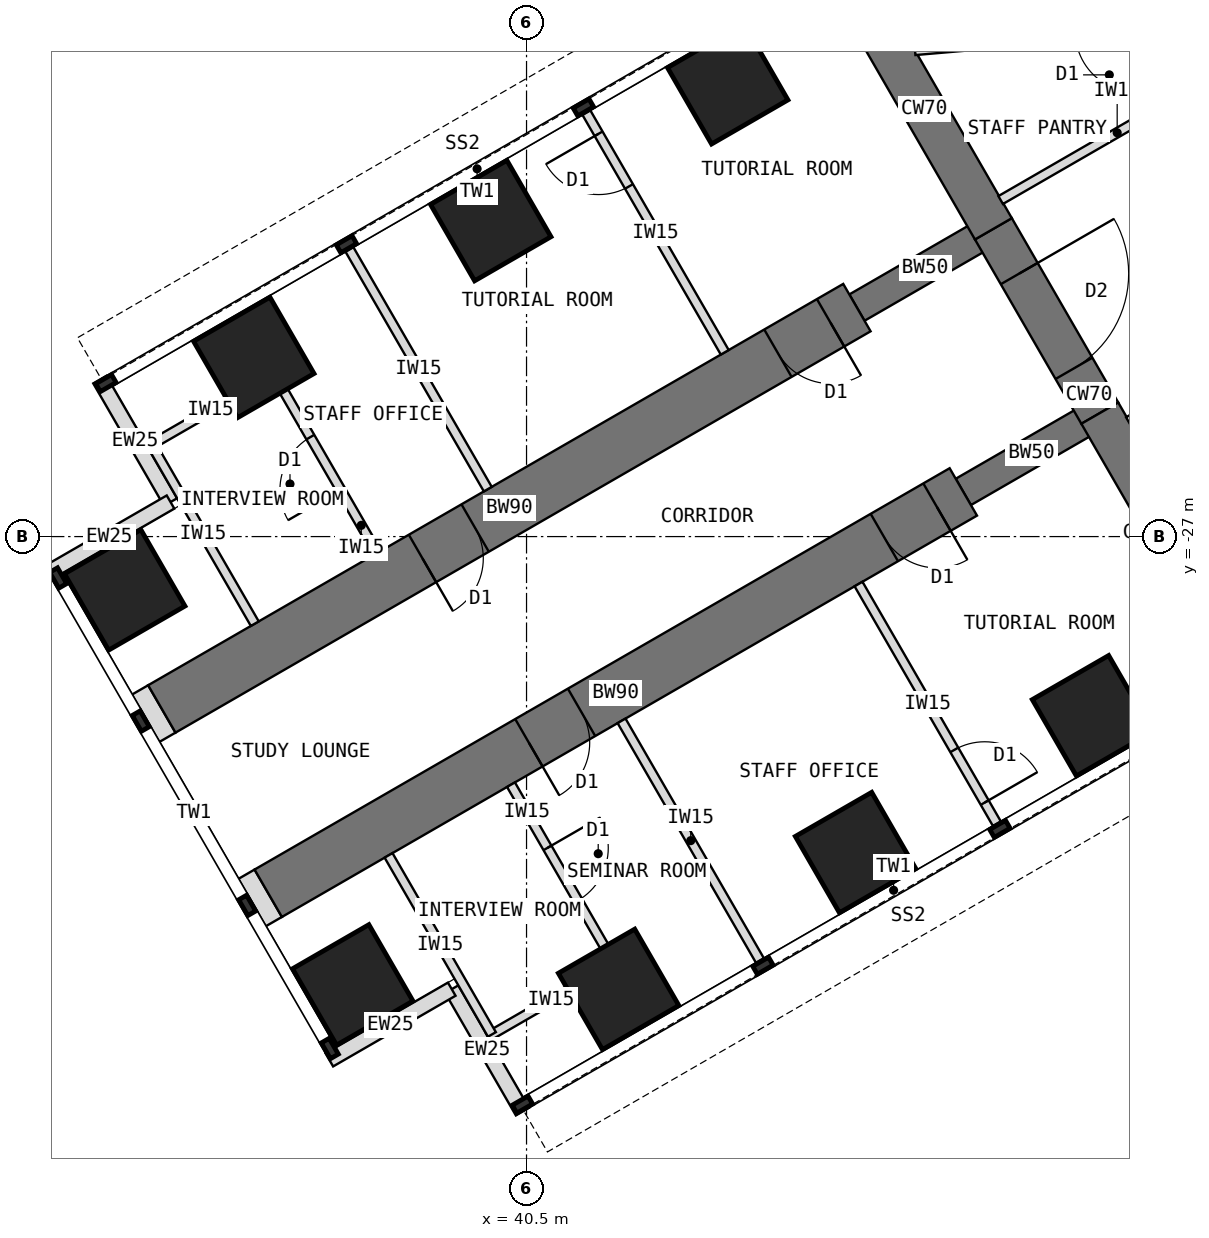
"""IFC4 building model, lengths in metres.
Left out: names, types, materials, properties, quantities, classifications, styles, units other than length and angle.
Written with IfcOpenShell. Run it as: python <this file> out.ifc"""

import sys

from ifc_helpers import new_model, si_unit, direction, frame, frame_2d, origin, origin_2d, place, context, subcontext, project, spatial, rectangle, extrude, element, fill, save


model = new_model("IFC4")
c1 = context("Model", 3, precision=1e-05, world=origin(), true_north=direction((0.0, 1.0)))
c2 = subcontext(c1, "Body", "Model", "MODEL_VIEW")
j1 = project(units=[si_unit("LENGTHUNIT", "METRE"), si_unit("PLANEANGLEUNIT", "RADIAN")], contexts=[c1])
p1 = place(None, origin())
s1 = spatial("IfcSite", under=j1, at=p1, CompositionType="ELEMENT")
p2 = place(p1, origin())
s2 = spatial("IfcBuilding", under=s1, at=p2, CompositionType="ELEMENT")
p3 = place(p2, frame((0.0, 0.0, 68.5)))
s3 = spatial("IfcBuildingStorey", under=s2, at=p3, CompositionType="ELEMENT", Elevation=68.5)
p4 = place(p3, frame((45.904, -18.0, 0.0), z_axis=(0.0, 0.0, 1.0), x_axis=(0.500024481964, -0.866011268655, 0.0)))
e1 = element("IfcWall", 1, at=p4, inside=s3, PredefinedType="SHEAR", context=c2, shape_type="SweptSolid", body=[
    extrude(rectangle(XDim=4.548, YDim=0.7, at=frame_2d((2.274, 0.0))), origin(), (0.0, 0.0, 1.0), 4.0),
])
p5 = place(p3, frame((48.178, -21.939, 0.0), z_axis=(0.0, 0.0, 1.0), x_axis=(0.500010275428, -0.866019471182, 0.0)))
e2 = element("IfcWall", 2, at=p5, inside=s3, PredefinedType="SHEAR", context=c2, shape_type="SweptSolid", body=[
    extrude(rectangle(XDim=3.5, YDim=0.7, at=frame_2d((1.75, 0.0))), origin(), (0.0, 0.0, 1.0), 4.0),
])
p6 = place(p5, frame((0.85, 0.0, 0.0)))
e3 = element("IfcOpeningElement", 3, at=p6, cuts=e2, PredefinedType="OPENING", context=c2, shape_type="SweptSolid", body=[
    extrude(rectangle(XDim=1.8, YDim=2.1, at=frame_2d((0.9, 1.05))), frame((0.0, 0.36, 0.0), z_axis=(0.0, -1.0, 0.0), x_axis=(1.0, 0.0, 0.0)), (0.0, 0.0, 1.0), 0.72),
])
p7 = place(p3, frame((49.928, -24.97, 0.0), z_axis=(0.0, 0.0, 1.0), x_axis=(0.499984222037, -0.866034513004, 0.0)))
e4 = element("IfcWall", 4, at=p7, inside=s3, PredefinedType="SHEAR", context=c2, shape_type="SweptSolid", body=[
    extrude(rectangle(XDim=4.548, YDim=0.7, at=frame_2d((2.274, 0.0))), origin(), (0.0, 0.0, 1.0), 4.0),
])
p8 = place(p3, frame((49.928, -24.97, 0.0), z_axis=(0.0, 0.0, 1.0), x_axis=(-0.866031863473, -0.499988811324, 0.0)))
e5 = element("IfcWall", 5, at=p8, inside=s3, PredefinedType="SHEAR", context=c2, shape_type="SweptSolid", body=[
    extrude(rectangle(XDim=2.592, YDim=0.5, at=frame_2d((1.296, 0.0))), origin(), (0.0, 0.0, 1.0), 4.0),
])
p9 = place(p3, frame((47.684, -26.266, 0.0), z_axis=(0.0, 0.0, 1.0), x_axis=(-0.866027579429, -0.499996231654, 0.0)))
e6 = element("IfcWall", 6, at=p9, inside=s3, PredefinedType="SHEAR", context=c2, shape_type="SweptSolid", body=[
    extrude(rectangle(XDim=13.2, YDim=0.9, at=frame_2d((6.6, 0.0))), origin(), (0.0, 0.0, 1.0), 4.0),
])
p10 = place(p9, frame((0.5, 0.0, 0.0)))
e7 = element("IfcOpeningElement", 7, at=p10, cuts=e6, PredefinedType="OPENING", context=c2, shape_type="SweptSolid", body=[
    extrude(rectangle(XDim=1.0, YDim=2.1, at=frame_2d((0.5, 1.05))), frame((0.0, 0.46, 0.0), z_axis=(0.0, -1.0, 0.0), x_axis=(1.0, 0.0, 0.0)), (0.0, 0.0, 1.0), 0.92),
])
p11 = place(p9, frame((7.25, 0.0, 0.0)))
e8 = element("IfcOpeningElement", 8, at=p11, cuts=e6, PredefinedType="OPENING", context=c2, shape_type="SweptSolid", body=[
    extrude(rectangle(XDim=1.0, YDim=2.1, at=frame_2d((0.5, 1.05))), frame((0.0, 0.46, 0.0), z_axis=(0.0, -1.0, 0.0), x_axis=(1.0, 0.0, 0.0)), (0.0, 0.0, 1.0), 0.92),
])
p12 = place(p3, frame((48.178, -21.939, 0.0), z_axis=(0.0, 0.0, 1.0), x_axis=(-0.866072649678, -0.499918158782, 0.0)))
e9 = element("IfcWall", 9, at=p12, inside=s3, PredefinedType="SHEAR", context=c2, shape_type="SweptSolid", body=[
    extrude(rectangle(XDim=2.592, YDim=0.5, at=frame_2d((1.296, 0.0))), origin(), (0.0, 0.0, 1.0), 4.0),
])
p13 = place(p3, frame((45.934, -23.234, 0.0), z_axis=(0.0, 0.0, 1.0), x_axis=(-0.866019570528, -0.500010103361, 0.0)))
e10 = element("IfcWall", 10, at=p13, inside=s3, PredefinedType="SHEAR", context=c2, shape_type="SweptSolid", body=[
    extrude(rectangle(XDim=13.2, YDim=0.9, at=frame_2d((6.6, 0.0))), origin(), (0.0, 0.0, 1.0), 4.0),
])
p14 = place(p13, frame((0.5, 0.0, 0.0)))
e11 = element("IfcOpeningElement", 11, at=p14, cuts=e10, PredefinedType="OPENING", context=c2, shape_type="SweptSolid", body=[
    extrude(rectangle(XDim=1.0, YDim=2.1, at=frame_2d((0.5, 1.05))), frame((0.0, 0.46, 0.0), z_axis=(0.0, -1.0, 0.0), x_axis=(1.0, 0.0, 0.0)), (0.0, 0.0, 1.0), 0.92),
])
p15 = place(p13, frame((7.25, 0.0, 0.0)))
e12 = element("IfcOpeningElement", 12, at=p15, cuts=e10, PredefinedType="OPENING", context=c2, shape_type="SweptSolid", body=[
    extrude(rectangle(XDim=1.0, YDim=2.1, at=frame_2d((0.5, 1.05))), frame((0.0, 0.46, 0.0), z_axis=(0.0, -1.0, 0.0), x_axis=(1.0, 0.0, 0.0)), (0.0, 0.0, 1.0), 0.92),
])
for number, where, z_axis, x_axis in (
    (13, (49.809, -29.946, 0.0), (0.0, 0.0, 1.0), (0.866, 0.5, 0.0)),
    (14, (43.809, -19.554, 0.0), (0.0, 0.0, 1.0), (0.866, 0.5, 0.0)),
    (15, (45.912, -32.196, 0.0), (0.0, 0.0, 1.0), (0.866, 0.5, 0.0)),
    (16, (39.912, -21.804, 0.0), (0.0, 0.0, 1.0), (0.866, 0.5, 0.0)),
    (17, (42.014, -34.446, 0.0), (0.0, 0.0, 1.0), (0.866, 0.5, 0.0)),
    (18, (36.014, -24.054, 0.0), (0.0, 0.0, 1.0), (0.866, 0.5, 0.0)),
    (19, (37.642, -34.373, 0.0), (0.0, 0.0, 1.0), (0.866, 0.5, 0.0)),
    (20, (33.892, -27.877, 0.0), (0.0, 0.0, 1.0), (0.866, 0.5, 0.0)),
):
    element("IfcColumn", number, at=place(p3, frame(where, z_axis=z_axis, x_axis=x_axis)), inside=s3, PredefinedType="COLUMN", context=c2, shape_type="SweptSolid", body=[
        extrude(rectangle(XDim=1.45, YDim=1.45, at=origin_2d()), origin(), (0.0, 0.0, 1.0), 4.0),
    ])
for number, where, z_axis, x_axis in (
    (21, (40.433, -36.456, 0.0), (0.0, 0.0, 1.0), (-0.5, 0.866, 0.0)),
    (22, (39.27, -34.443, 0.0), (0.0, 0.0, 1.0), (-0.866, -0.5, 0.0)),
    (23, (33.483, -24.419, 0.0), (0.0, 0.0, 1.0), (0.5, -0.866, 0.0)),
    (24, (34.645, -26.432, 0.0), (0.0, 0.0, 1.0), (-0.866, -0.5, 0.0)),
):
    element("IfcWall", number, at=place(p3, frame(where, z_axis=z_axis, x_axis=x_axis)), inside=s3, PredefinedType="STANDARD", context=c2, shape_type="SweptSolid", body=[
        extrude(rectangle(XDim=2.325, YDim=0.25, at=frame_2d((1.163, 0.0))), origin(), (0.0, 0.0, 1.0), 3.8),
    ])
for number, where, z_axis, x_axis in (
    (25, (36.252, -32.865, 0.0), (0.0, 0.0, 1.0), (-0.866, -0.5, 0.0)),
    (26, (34.502, -29.834, 0.0), (0.0, 0.0, 1.0), (-0.866, -0.5, 0.0)),
):
    element("IfcWall", number, at=place(p3, frame(where, z_axis=z_axis, x_axis=x_axis)), inside=s3, PredefinedType="PARTITIONING", context=c2, shape_type="SweptSolid", body=[
        extrude(rectangle(XDim=0.31, YDim=0.9, at=frame_2d((0.155, 0.0))), origin(), (0.0, 0.0, 1.0), 3.8),
    ])
p16 = place(p3, frame((52.38, -19.201, 0.0), z_axis=(0.0, 0.0, 1.0), x_axis=(-0.866023886965, 0.500002627198, 0.0)))
e27 = element("IfcWall", 27, at=p16, inside=s3, PredefinedType="SHEAR", context=c2, shape_type="SweptSolid", body=[
    extrude(rectangle(XDim=5.858, YDim=0.4, at=frame_2d((2.929, 0.0))), origin(), (0.0, 0.0, 1.0), 4.0),
])
p17 = place(p3, frame((45.96, -27.78, 0.0), z_axis=(0.0, 0.0, 1.0), x_axis=(0.499982560684, -0.866035472144, 0.0)))
e28 = element("IfcWall", 28, at=p17, inside=s3, PredefinedType="PARTITIONING", context=c2, shape_type="SweptSolid", body=[
    extrude(rectangle(XDim=4.55, YDim=0.15, at=frame_2d((2.275, 0.0))), origin(), (0.0, 0.0, 1.0), 3.8),
])
p18 = place(p17, frame((3.15, 0.0, 0.0)))
e29 = element("IfcOpeningElement", 29, at=p18, cuts=e28, PredefinedType="OPENING", context=c2, shape_type="SweptSolid", body=[
    extrude(rectangle(XDim=1.0, YDim=2.1, at=frame_2d((0.5, 1.05))), frame((0.0, 0.085, 0.0), z_axis=(0.0, -1.0, 0.0), x_axis=(1.0, 0.0, 0.0)), (0.0, 0.0, 1.0), 0.17),
])
p19 = place(p3, frame((42.063, -30.03, 0.0), z_axis=(0.0, 0.0, 1.0), x_axis=(0.499982560684, -0.866035472144, 0.0)))
e30 = element("IfcWall", 30, at=p19, inside=s3, PredefinedType="PARTITIONING", context=c2, shape_type="SweptSolid", body=[
    extrude(rectangle(XDim=4.55, YDim=0.15, at=frame_2d((2.275, 0.0))), origin(), (0.0, 0.0, 1.0), 3.8),
])
p20 = place(p3, frame((41.944, -34.025, 0.0), z_axis=(0.0, 0.0, 1.0), x_axis=(-0.865980596518, -0.500077600433, 0.0)))
e31 = element("IfcWall", 31, at=p20, inside=s3, PredefinedType="PARTITIONING", context=c2, shape_type="SweptSolid", body=[
    extrude(rectangle(XDim=2.4, YDim=0.15, at=frame_2d((1.2, 0.0))), origin(), (0.0, 0.0, 1.0), 3.8),
])
p21 = place(p3, frame((40.244, -31.08, 0.0), z_axis=(0.0, 0.0, 1.0), x_axis=(0.500008388397, -0.866020560687, 0.0)))
e32 = element("IfcWall", 32, at=p21, inside=s3, PredefinedType="PARTITIONING", context=c2, shape_type="SweptSolid", body=[
    extrude(rectangle(XDim=3.4, YDim=0.15, at=frame_2d((1.7, 0.0))), origin(), (0.0, 0.0, 1.0), 3.8),
])
p22 = place(p21, frame((1.2, 0.0, 0.0)))
e33 = element("IfcOpeningElement", 33, at=p22, cuts=e32, PredefinedType="OPENING", context=c2, shape_type="SweptSolid", body=[
    extrude(rectangle(XDim=1.0, YDim=2.1, at=frame_2d((0.5, 1.05))), frame((0.0, 0.085, 0.0), z_axis=(0.0, -1.0, 0.0), x_axis=(1.0, 0.0, 0.0)), (0.0, 0.0, 1.0), 0.17),
])
p23 = place(p3, frame((38.231, -32.243, 0.0), z_axis=(0.0, 0.0, 1.0), x_axis=(0.500031147688, -0.866007419912, 0.0)))
e34 = element("IfcWall", 34, at=p23, inside=s3, PredefinedType="PARTITIONING", context=c2, shape_type="SweptSolid", body=[
    extrude(rectangle(XDim=3.4, YDim=0.15, at=frame_2d((1.7, 0.0))), origin(), (0.0, 0.0, 1.0), 3.8),
])
p24 = place(p3, frame((43.76, -23.97, 0.0), z_axis=(0.0, 0.0, 1.0), x_axis=(-0.499982560684, 0.866035472144, 0.0)))
e35 = element("IfcWall", 35, at=p24, inside=s3, PredefinedType="PARTITIONING", context=c2, shape_type="SweptSolid", body=[
    extrude(rectangle(XDim=4.55, YDim=0.15, at=frame_2d((2.275, 0.0))), origin(), (0.0, 0.0, 1.0), 3.8),
])
p25 = place(p24, frame((3.15, 0.0, 0.0)))
e36 = element("IfcOpeningElement", 36, at=p25, cuts=e35, PredefinedType="OPENING", context=c2, shape_type="SweptSolid", body=[
    extrude(rectangle(XDim=1.0, YDim=2.1, at=frame_2d((0.5, 1.05))), frame((0.0, 0.085, 0.0), z_axis=(0.0, -1.0, 0.0), x_axis=(1.0, 0.0, 0.0)), (0.0, 0.0, 1.0), 0.17),
])
p26 = place(p3, frame((39.863, -26.22, 0.0), z_axis=(0.0, 0.0, 1.0), x_axis=(-0.500022803284, 0.866012237902, 0.0)))
e37 = element("IfcWall", 37, at=p26, inside=s3, PredefinedType="PARTITIONING", context=c2, shape_type="SweptSolid", body=[
    extrude(rectangle(XDim=4.55, YDim=0.15, at=frame_2d((2.275, 0.0))), origin(), (0.0, 0.0, 1.0), 3.8),
])
p27 = place(p3, frame((36.344, -24.325, 0.0), z_axis=(0.0, 0.0, 1.0), x_axis=(-0.866024647952, -0.500001309137, 0.0)))
e38 = element("IfcWall", 38, at=p27, inside=s3, PredefinedType="PARTITIONING", context=c2, shape_type="SweptSolid", body=[
    extrude(rectangle(XDim=2.4, YDim=0.15, at=frame_2d((1.2, 0.0))), origin(), (0.0, 0.0, 1.0), 3.8),
])
p28 = place(p3, frame((38.044, -27.27, 0.0), z_axis=(0.0, 0.0, 1.0), x_axis=(-0.500031147688, 0.866007419912, 0.0)))
e39 = element("IfcWall", 39, at=p28, inside=s3, PredefinedType="PARTITIONING", context=c2, shape_type="SweptSolid", body=[
    extrude(rectangle(XDim=3.4, YDim=0.15, at=frame_2d((1.7, 0.0))), origin(), (0.0, 0.0, 1.0), 3.8),
])
p29 = place(p28, frame((1.2, 0.0, 0.0)))
e40 = element("IfcOpeningElement", 40, at=p29, cuts=e39, PredefinedType="OPENING", context=c2, shape_type="SweptSolid", body=[
    extrude(rectangle(XDim=1.0, YDim=2.1, at=frame_2d((0.5, 1.05))), frame((0.0, 0.085, 0.0), z_axis=(0.0, -1.0, 0.0), x_axis=(1.0, 0.0, 0.0)), (0.0, 0.0, 1.0), 0.17),
])
p30 = place(p3, frame((36.031, -28.432, 0.0), z_axis=(0.0, 0.0, 1.0), x_axis=(-0.500008388397, 0.866020560687, 0.0)))
e41 = element("IfcWall", 41, at=p30, inside=s3, PredefinedType="PARTITIONING", context=c2, shape_type="SweptSolid", body=[
    extrude(rectangle(XDim=3.4, YDim=0.15, at=frame_2d((1.7, 0.0))), origin(), (0.0, 0.0, 1.0), 3.8),
])
p31 = place(p3, frame((48.298, -21.466, 0.0), z_axis=(0.0, 0.0, 1.0), x_axis=(0.866021148949, 0.500007369519, 0.0)))
e42 = element("IfcWall", 42, at=p31, inside=s3, PredefinedType="PARTITIONING", context=c2, shape_type="SweptSolid", body=[
    extrude(rectangle(XDim=4.426, YDim=0.15, at=frame_2d((2.213, 0.0))), origin(), (0.0, 0.0, 1.0), 3.8),
])
p32 = place(p31, frame((2.598, 0.0, 0.0)))
e43 = element("IfcOpeningElement", 43, at=p32, cuts=e42, PredefinedType="OPENING", context=c2, shape_type="SweptSolid", body=[
    extrude(rectangle(XDim=1.0, YDim=2.1, at=frame_2d((0.5, 1.05))), frame((0.0, 0.085, 0.0), z_axis=(0.0, -1.0, 0.0), x_axis=(1.0, 0.0, 0.0)), (0.0, 0.0, 1.0), 0.17),
])
p33 = place(p3, frame((54.23, -22.89, 0.0), z_axis=(0.0, 0.0, 1.0), x_axis=(-0.866021148949, -0.500007369519, 0.0)))
e44 = element("IfcWall", 44, at=p33, inside=s3, PredefinedType="PARTITIONING", context=c2, shape_type="SweptSolid", body=[
    extrude(rectangle(XDim=4.426, YDim=0.15, at=frame_2d((2.213, 0.0))), origin(), (0.0, 0.0, 1.0), 3.8),
])
p34 = place(p33, frame((0.828, 0.0, 0.0)))
e45 = element("IfcOpeningElement", 45, at=p34, cuts=e44, PredefinedType="OPENING", context=c2, shape_type="SweptSolid", body=[
    extrude(rectangle(XDim=1.0, YDim=2.1, at=frame_2d((0.5, 1.05))), frame((0.0, 0.085, 0.0), z_axis=(0.0, -1.0, 0.0), x_axis=(1.0, 0.0, 0.0)), (0.0, 0.0, 1.0), 0.17),
])
p35 = place(p3, frame((51.371, -18.618, 0.0), z_axis=(0.0, 0.0, 1.0), x_axis=(-0.996259708579, -0.086409450071, 0.0)))
e46 = element("IfcWall", 46, at=p35, inside=s3, PredefinedType="PARTITIONING", context=c2, shape_type="SweptSolid", body=[
    extrude(rectangle(XDim=4.498, YDim=0.15, at=frame_2d((2.249, 0.0))), origin(), (0.0, 0.0, 1.0), 3.8),
])
p36 = place(p35, frame((0.849, 0.0, 0.0)))
e47 = element("IfcOpeningElement", 47, at=p36, cuts=e46, PredefinedType="OPENING", context=c2, shape_type="SweptSolid", body=[
    extrude(rectangle(XDim=1.0, YDim=2.1, at=frame_2d((0.5, 1.05))), frame((0.0, 0.085, 0.0), z_axis=(0.0, -1.0, 0.0), x_axis=(1.0, 0.0, 0.0)), (0.0, 0.0, 1.0), 0.17),
])
p37 = place(p6, origin())
e48 = element("IfcDoor", 48, at=p37, inside=s3, OperationType="DOUBLE_DOOR_DOUBLE_SWING", PredefinedType="DOOR", context=c2, shape_type="SweptSolid", body=[
    extrude(rectangle(XDim=1.72, YDim=2.06, at=frame_2d((0.9, 1.03))), frame((0.0, 0.025, 0.0), z_axis=(0.0, -1.0, 0.0), x_axis=(1.0, 0.0, 0.0)), (0.0, 0.0, 1.0), 0.05),
    extrude(rectangle(XDim=0.04, YDim=2.1, at=frame_2d((0.02, 1.05))), frame((0.0, 0.35, 0.0), z_axis=(0.0, -1.0, 0.0), x_axis=(1.0, 0.0, 0.0)), (0.0, 0.0, 1.0), 0.699),
    extrude(rectangle(XDim=0.04, YDim=2.1, at=frame_2d((1.78, 1.05))), frame((0.0, 0.35, 0.0), z_axis=(0.0, -1.0, 0.0), x_axis=(1.0, 0.0, 0.0)), (0.0, 0.0, 1.0), 0.699),
    extrude(rectangle(XDim=1.72, YDim=0.04, at=frame_2d((0.9, 2.08))), frame((0.0, 0.35, 0.0), z_axis=(0.0, -1.0, 0.0), x_axis=(1.0, 0.0, 0.0)), (0.0, 0.0, 1.0), 0.699),
])
fill(e3, e48)
p38 = place(p18, origin())
e49 = element("IfcDoor", 49, at=p38, inside=s3, OperationType="SINGLE_SWING_RIGHT", PredefinedType="DOOR", context=c2, shape_type="SweptSolid", body=[
    extrude(rectangle(XDim=1.0, YDim=2.1, at=frame_2d((0.5, 1.05))), frame((0.0, 0.025, 0.0), z_axis=(0.0, -1.0, 0.0), x_axis=(1.0, 0.0, 0.0)), (0.0, 0.0, 1.0), 0.05),
])
fill(e29, e49)
p39 = place(p22, origin())
e50 = element("IfcDoor", 50, at=p39, inside=s3, OperationType="SINGLE_SWING_LEFT", PredefinedType="DOOR", context=c2, shape_type="SweptSolid", body=[
    extrude(rectangle(XDim=1.0, YDim=2.1, at=frame_2d((0.5, 1.05))), frame((0.0, 0.025, 0.0), z_axis=(0.0, -1.0, 0.0), x_axis=(1.0, 0.0, 0.0)), (0.0, 0.0, 1.0), 0.05),
])
fill(e33, e50)
p40 = place(p25, origin())
e51 = element("IfcDoor", 51, at=p40, inside=s3, OperationType="SINGLE_SWING_RIGHT", PredefinedType="DOOR", context=c2, shape_type="SweptSolid", body=[
    extrude(rectangle(XDim=1.0, YDim=2.1, at=frame_2d((0.5, 1.05))), frame((0.0, 0.025, 0.0), z_axis=(0.0, -1.0, 0.0), x_axis=(1.0, 0.0, 0.0)), (0.0, 0.0, 1.0), 0.05),
])
fill(e36, e51)
p41 = place(p29, origin())
e52 = element("IfcDoor", 52, at=p41, inside=s3, OperationType="SINGLE_SWING_LEFT", PredefinedType="DOOR", context=c2, shape_type="SweptSolid", body=[
    extrude(rectangle(XDim=1.0, YDim=2.1, at=frame_2d((0.5, 1.05))), frame((0.0, 0.025, 0.0), z_axis=(0.0, -1.0, 0.0), x_axis=(1.0, 0.0, 0.0)), (0.0, 0.0, 1.0), 0.05),
])
fill(e40, e52)
p42 = place(p10, origin())
e53 = element("IfcDoor", 53, at=p42, inside=s3, OperationType="SINGLE_SWING_LEFT", PredefinedType="DOOR", context=c2, shape_type="SweptSolid", body=[
    extrude(rectangle(XDim=0.92, YDim=2.06, at=frame_2d((0.5, 1.03))), frame((0.0, 0.025, 0.0), z_axis=(0.0, -1.0, 0.0), x_axis=(1.0, 0.0, 0.0)), (0.0, 0.0, 1.0), 0.05),
    extrude(rectangle(XDim=0.04, YDim=2.1, at=frame_2d((0.02, 1.05))), frame((0.0, 0.45, 0.0), z_axis=(0.0, -1.0, 0.0), x_axis=(1.0, 0.0, 0.0)), (0.0, 0.0, 1.0), 0.899),
    extrude(rectangle(XDim=0.04, YDim=2.1, at=frame_2d((0.98, 1.05))), frame((0.0, 0.45, 0.0), z_axis=(0.0, -1.0, 0.0), x_axis=(1.0, 0.0, 0.0)), (0.0, 0.0, 1.0), 0.899),
    extrude(rectangle(XDim=0.92, YDim=0.04, at=frame_2d((0.5, 2.08))), frame((0.0, 0.45, 0.0), z_axis=(0.0, -1.0, 0.0), x_axis=(1.0, 0.0, 0.0)), (0.0, 0.0, 1.0), 0.899),
])
fill(e7, e53)
p43 = place(p11, origin())
e54 = element("IfcDoor", 54, at=p43, inside=s3, OperationType="SINGLE_SWING_RIGHT", PredefinedType="DOOR", context=c2, shape_type="SweptSolid", body=[
    extrude(rectangle(XDim=0.92, YDim=2.06, at=frame_2d((0.5, 1.03))), frame((0.0, 0.025, 0.0), z_axis=(0.0, -1.0, 0.0), x_axis=(1.0, 0.0, 0.0)), (0.0, 0.0, 1.0), 0.05),
    extrude(rectangle(XDim=0.04, YDim=2.1, at=frame_2d((0.02, 1.05))), frame((0.0, 0.45, 0.0), z_axis=(0.0, -1.0, 0.0), x_axis=(1.0, 0.0, 0.0)), (0.0, 0.0, 1.0), 0.899),
    extrude(rectangle(XDim=0.04, YDim=2.1, at=frame_2d((0.98, 1.05))), frame((0.0, 0.45, 0.0), z_axis=(0.0, -1.0, 0.0), x_axis=(1.0, 0.0, 0.0)), (0.0, 0.0, 1.0), 0.899),
    extrude(rectangle(XDim=0.92, YDim=0.04, at=frame_2d((0.5, 2.08))), frame((0.0, 0.45, 0.0), z_axis=(0.0, -1.0, 0.0), x_axis=(1.0, 0.0, 0.0)), (0.0, 0.0, 1.0), 0.899),
])
fill(e8, e54)
p44 = place(p14, origin())
e55 = element("IfcDoor", 55, at=p44, inside=s3, OperationType="SINGLE_SWING_LEFT", PredefinedType="DOOR", context=c2, shape_type="SweptSolid", body=[
    extrude(rectangle(XDim=0.92, YDim=2.06, at=frame_2d((0.5, 1.03))), frame((0.0, 0.025, 0.0), z_axis=(0.0, -1.0, 0.0), x_axis=(1.0, 0.0, 0.0)), (0.0, 0.0, 1.0), 0.05),
    extrude(rectangle(XDim=0.04, YDim=2.1, at=frame_2d((0.02, 1.05))), frame((0.0, 0.45, 0.0), z_axis=(0.0, -1.0, 0.0), x_axis=(1.0, 0.0, 0.0)), (0.0, 0.0, 1.0), 0.899),
    extrude(rectangle(XDim=0.04, YDim=2.1, at=frame_2d((0.98, 1.05))), frame((0.0, 0.45, 0.0), z_axis=(0.0, -1.0, 0.0), x_axis=(1.0, 0.0, 0.0)), (0.0, 0.0, 1.0), 0.899),
    extrude(rectangle(XDim=0.92, YDim=0.04, at=frame_2d((0.5, 2.08))), frame((0.0, 0.45, 0.0), z_axis=(0.0, -1.0, 0.0), x_axis=(1.0, 0.0, 0.0)), (0.0, 0.0, 1.0), 0.899),
])
fill(e11, e55)
p45 = place(p15, origin())
e56 = element("IfcDoor", 56, at=p45, inside=s3, OperationType="SINGLE_SWING_RIGHT", PredefinedType="DOOR", context=c2, shape_type="SweptSolid", body=[
    extrude(rectangle(XDim=0.92, YDim=2.06, at=frame_2d((0.5, 1.03))), frame((0.0, 0.025, 0.0), z_axis=(0.0, -1.0, 0.0), x_axis=(1.0, 0.0, 0.0)), (0.0, 0.0, 1.0), 0.05),
    extrude(rectangle(XDim=0.04, YDim=2.1, at=frame_2d((0.02, 1.05))), frame((0.0, 0.45, 0.0), z_axis=(0.0, -1.0, 0.0), x_axis=(1.0, 0.0, 0.0)), (0.0, 0.0, 1.0), 0.899),
    extrude(rectangle(XDim=0.04, YDim=2.1, at=frame_2d((0.98, 1.05))), frame((0.0, 0.45, 0.0), z_axis=(0.0, -1.0, 0.0), x_axis=(1.0, 0.0, 0.0)), (0.0, 0.0, 1.0), 0.899),
    extrude(rectangle(XDim=0.92, YDim=0.04, at=frame_2d((0.5, 2.08))), frame((0.0, 0.45, 0.0), z_axis=(0.0, -1.0, 0.0), x_axis=(1.0, 0.0, 0.0)), (0.0, 0.0, 1.0), 0.899),
])
fill(e12, e56)
save(model, sys.argv[1])
